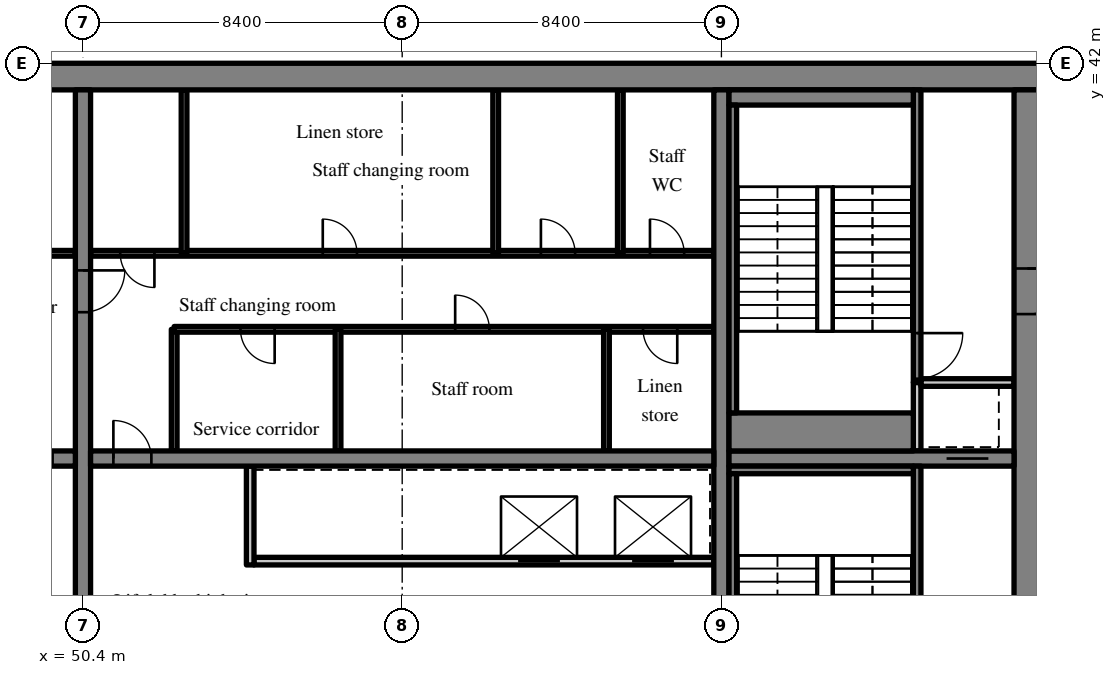
"""IFC4 building model, lengths in metres.
Left out: names, types, materials, properties, quantities, classifications, styles, units other than length and angle.
Written with IfcOpenShell. Run it as: python <this file> out.ifc"""

import sys

from ifc_helpers import new_model, si_unit, direction, frame, frame_2d, origin, place, context, subcontext, project, spatial, rectangle, extrude, source, transform, mapped, element, fill, save


model = new_model("IFC4")
c1 = context("Model", 3, precision=1e-05, world=origin(), true_north=direction((0.0, 1.0)))
c2 = subcontext(c1, "Body", "Model", "MODEL_VIEW")
j1 = project(units=[si_unit("LENGTHUNIT", "METRE"), si_unit("PLANEANGLEUNIT", "RADIAN")], contexts=[c1])
p1 = place(None, origin())
s1 = spatial("IfcSite", under=j1, at=p1, CompositionType="ELEMENT")
p2 = place(p1, origin())
s2 = spatial("IfcBuilding", under=s1, at=p2, CompositionType="ELEMENT")
p3 = place(p2, frame((0.0, 0.0, 146.2)))
s3 = spatial("IfcBuildingStorey", under=s2, at=p3, CompositionType="ELEMENT", Elevation=146.2)
m1 = source(origin(), c2, "Body", "SweptSolid", [
    extrude(rectangle(XDim=50.4, YDim=0.7, at=frame_2d((25.2, 0.0))), origin(), (0.0, 0.0, 1.0), 5.12),
])
p4 = place(p3, frame((25.2, 41.65, 0.0), z_axis=(0.0, 0.0, 1.0), x_axis=(1.0, 0.0, 0.0)))
e1 = element("IfcWall", 1, at=p4, inside=s3, PredefinedType="SHEAR", context=c2, shape_type="MappedRepresentation", body=[
    mapped(m1, transform((0.0, 0.0, 0.0), scale=1.0)),
])
m2 = source(origin(), c2, "Body", "SweptSolid", [
    extrude(rectangle(XDim=18.6, YDim=0.7, at=frame_2d((9.3, 0.0))), origin(), (0.0, 0.0, 1.0), 5.12),
])
p5 = place(p3, frame((75.25, 22.7, 0.0), z_axis=(0.0, 0.0, 1.0), x_axis=(0.0, 1.0, 0.0)))
e2 = element("IfcWall", 2, at=p5, inside=s3, PredefinedType="SHEAR", context=c2, shape_type="MappedRepresentation", body=[
    mapped(m2, transform((0.0, 0.0, 0.0), scale=1.0)),
])
m3 = source(origin(), c2, "Body", "SweptSolid", [
    extrude(rectangle(XDim=1.2, YDim=2.1, at=frame_2d((0.6, 1.05))), frame((0.0, 0.36, 0.0), z_axis=(0.0, -1.0, 0.0), x_axis=(1.0, 0.0, 0.0)), (0.0, 0.0, 1.0), 0.72),
])
p6 = place(p5, frame((12.7, 0.0, 0.0)))
e3 = element("IfcOpeningElement", 3, at=p6, cuts=e2, PredefinedType="OPENING", context=c2, shape_type="MappedRepresentation", body=[
    mapped(m3, transform((0.0, 0.0, 0.0), scale=1.0)),
])
m4 = source(origin(), c2, "Body", "SweptSolid", [
    extrude(rectangle(XDim=18.6, YDim=0.4, at=frame_2d((9.3, 0.0))), origin(), (0.0, 0.0, 1.0), 5.12),
])
p7 = place(p3, frame((50.4, 22.7, 0.0), z_axis=(0.0, 0.0, 1.0), x_axis=(0.0, 1.0, 0.0)))
e4 = element("IfcWall", 4, at=p7, inside=s3, PredefinedType="SHEAR", context=c2, shape_type="MappedRepresentation", body=[
    mapped(m4, transform((0.0, 0.0, 0.0), scale=1.0)),
])
m5 = source(origin(), c2, "Body", "SweptSolid", [
    extrude(rectangle(XDim=1.1, YDim=2.1, at=frame_2d((0.55, 1.05))), frame((0.0, 0.21, 0.0), z_axis=(0.0, -1.0, 0.0), x_axis=(1.0, 0.0, 0.0)), (0.0, 0.0, 1.0), 0.42),
])
p8 = place(p7, frame((12.75, 0.0, 0.0)))
e5 = element("IfcOpeningElement", 5, at=p8, cuts=e4, PredefinedType="OPENING", context=c2, shape_type="MappedRepresentation", body=[
    mapped(m5, transform((0.0, 0.0, 0.0), scale=1.0)),
])
p9 = place(p3, frame((67.2, 22.7, 0.0), z_axis=(0.0, 0.0, 1.0), x_axis=(0.0, 1.0, 0.0)))
e6 = element("IfcWall", 6, at=p9, inside=s3, PredefinedType="SHEAR", context=c2, shape_type="MappedRepresentation", body=[
    mapped(m4, transform((0.0, 0.0, 0.0), scale=1.0)),
])
m6 = source(origin(), c2, "Body", "SweptSolid", [
    extrude(rectangle(XDim=16.4, YDim=0.4, at=frame_2d((8.2, 0.0))), origin(), (0.0, 0.0, 1.0), 5.12),
])
p10 = place(p3, frame((33.8, 31.6, 0.0), z_axis=(0.0, 0.0, 1.0), x_axis=(1.0, 0.0, 0.0)))
e7 = element("IfcWall", 7, at=p10, inside=s3, PredefinedType="SHEAR", context=c2, shape_type="MappedRepresentation", body=[
    mapped(m6, transform((0.0, 0.0, 0.0), scale=1.0)),
])
m7 = source(origin(), c2, "Body", "SweptSolid", [
    extrude(rectangle(XDim=1.0, YDim=2.1, at=frame_2d((0.5, 1.05))), frame((0.0, 0.21, 0.0), z_axis=(0.0, -1.0, 0.0), x_axis=(1.0, 0.0, 0.0)), (0.0, 0.0, 1.0), 0.42),
])
p11 = place(p10, frame((14.8, 0.0, 0.0)))
e8 = element("IfcOpeningElement", 8, at=p11, cuts=e7, PredefinedType="OPENING", context=c2, shape_type="MappedRepresentation", body=[
    mapped(m7, transform((0.0, 0.0, 0.0), scale=1.0)),
])
p12 = place(p3, frame((50.6, 31.6, 0.0), z_axis=(0.0, 0.0, 1.0), x_axis=(1.0, 0.0, 0.0)))
e9 = element("IfcWall", 9, at=p12, inside=s3, PredefinedType="SHEAR", context=c2, shape_type="MappedRepresentation", body=[
    mapped(m6, transform((0.0, 0.0, 0.0), scale=1.0)),
])
p13 = place(p12, frame((0.6, 0.0, 0.0)))
e10 = element("IfcOpeningElement", 10, at=p13, cuts=e9, PredefinedType="OPENING", context=c2, shape_type="MappedRepresentation", body=[
    mapped(m7, transform((0.0, 0.0, 0.0), scale=1.0)),
])
m8 = source(origin(), c2, "Body", "SweptSolid", [
    extrude(rectangle(XDim=7.5, YDim=0.4, at=frame_2d((3.75, 0.0))), origin(), (0.0, 0.0, 1.0), 5.12),
])
p14 = place(p3, frame((67.4, 31.6, 0.0), z_axis=(0.0, 0.0, 1.0), x_axis=(1.0, 0.0, 0.0)))
e11 = element("IfcWall", 11, at=p14, inside=s3, PredefinedType="SHEAR", context=c2, shape_type="MappedRepresentation", body=[
    mapped(m8, transform((0.0, 0.0, 0.0), scale=1.0)),
])
p15 = place(p14, frame((5.725, 0.0, 0.0)))
e12 = element("IfcOpeningElement", 12, at=p15, cuts=e11, PredefinedType="OPENING", context=c2, shape_type="MappedRepresentation", body=[
    mapped(m5, transform((0.0, 0.0, 0.0), scale=1.0)),
])
m9 = source(origin(), c2, "Body", "SweptSolid", [
    extrude(rectangle(XDim=3.559, YDim=0.3, at=frame_2d((1.78, 0.0))), origin(), (0.0, 0.0, 1.0), 5.12),
])
p16 = place(p3, frame((76.523, 43.292, 0.0), z_axis=(0.0, 0.0, 1.0), x_axis=(-0.35779745313, -0.933799219604, 0.0)))
e13 = element("IfcWall", 13, at=p16, inside=s3, PredefinedType="SOLIDWALL", context=c2, shape_type="MappedRepresentation", body=[
    mapped(m9, transform((0.0, 0.0, 0.0), scale=1.0)),
])
m10 = source(origin(), c2, "Body", "SweptSolid", [
    extrude(rectangle(XDim=1.5, YDim=2.0, at=frame_2d((0.75, 1.0))), frame((0.0, 0.16, 0.0), z_axis=(0.0, -1.0, 0.0), x_axis=(1.0, 0.0, 0.0)), (0.0, 0.0, 1.0), 0.32),
])
p17 = place(p16, frame((0.156, 0.0, 0.9)))
e14 = element("IfcOpeningElement", 14, at=p17, cuts=e13, PredefinedType="OPENING", context=c2, shape_type="MappedRepresentation", body=[
    mapped(m10, transform((0.0, 0.0, 0.0), scale=1.0)),
])
m11 = source(origin(), c2, "Body", "SweptSolid", [
    extrude(rectangle(XDim=16.4, YDim=0.15, at=frame_2d((8.2, 0.0))), origin(), (0.0, 0.0, 1.0), 5.12),
])
p18 = place(p3, frame((33.8, 37.0, 0.0), z_axis=(0.0, 0.0, 1.0), x_axis=(1.0, 0.0, 0.0)))
e15 = element("IfcWall", 15, at=p18, inside=s3, PredefinedType="PARTITIONING", context=c2, shape_type="MappedRepresentation", body=[
    mapped(m11, transform((0.0, 0.0, 0.0), scale=1.0)),
])
m12 = source(origin(), c2, "Body", "SweptSolid", [
    extrude(rectangle(XDim=0.9, YDim=2.1, at=frame_2d((0.45, 1.05))), frame((0.0, 0.085, 0.0), z_axis=(0.0, -1.0, 0.0), x_axis=(1.0, 0.0, 0.0)), (0.0, 0.0, 1.0), 0.17),
])
p19 = place(p18, frame((3.24, 0.0, 0.0)))
e16 = element("IfcOpeningElement", 16, at=p19, cuts=e15, PredefinedType="OPENING", context=c2, shape_type="MappedRepresentation", body=[
    mapped(m12, transform((0.0, 0.0, 0.0), scale=1.0)),
])
p20 = place(p18, frame((8.16, 0.0, 0.0)))
e17 = element("IfcOpeningElement", 17, at=p20, cuts=e15, PredefinedType="OPENING", context=c2, shape_type="MappedRepresentation", body=[
    mapped(m12, transform((0.0, 0.0, 0.0), scale=1.0)),
])
p21 = place(p18, frame((11.44, 0.0, 0.0)))
e18 = element("IfcOpeningElement", 18, at=p21, cuts=e15, PredefinedType="OPENING", context=c2, shape_type="MappedRepresentation", body=[
    mapped(m12, transform((0.0, 0.0, 0.0), scale=1.0)),
])
p22 = place(p18, frame((14.72, 0.0, 0.0)))
e19 = element("IfcOpeningElement", 19, at=p22, cuts=e15, PredefinedType="OPENING", context=c2, shape_type="MappedRepresentation", body=[
    mapped(m12, transform((0.0, 0.0, 0.0), scale=1.0)),
])
m13 = source(origin(), c2, "Body", "SweptSolid", [
    extrude(rectangle(XDim=12.1, YDim=0.2, at=frame_2d((6.05, 0.0))), origin(), (0.0, 0.0, 1.0), 5.12),
])
p23 = place(p3, frame((67.0, 28.9, 0.0), z_axis=(0.0, 0.0, 1.0), x_axis=(-1.0, 0.0, 0.0)))
e20 = element("IfcWall", 20, at=p23, inside=s3, PredefinedType="SOLIDWALL", context=c2, shape_type="MappedRepresentation", body=[
    mapped(m13, transform((0.0, 0.0, 0.0), scale=1.0)),
])
m14 = source(origin(), c2, "Body", "SweptSolid", [
    extrude(rectangle(XDim=1.1, YDim=2.1, at=frame_2d((0.55, 1.05))), frame((0.0, 0.11, 0.0), z_axis=(0.0, -1.0, 0.0), x_axis=(1.0, 0.0, 0.0)), (0.0, 0.0, 1.0), 0.22),
])
p24 = place(p23, frame((1.05, 0.0, 0.0)))
e21 = element("IfcOpeningElement", 21, at=p24, cuts=e20, PredefinedType="OPENING", context=c2, shape_type="MappedRepresentation", body=[
    mapped(m14, transform((0.0, 0.0, 0.0), scale=1.0)),
])
p25 = place(p23, frame((4.05, 0.0, 0.0)))
e22 = element("IfcOpeningElement", 22, at=p25, cuts=e20, PredefinedType="OPENING", context=c2, shape_type="MappedRepresentation", body=[
    mapped(m14, transform((0.0, 0.0, 0.0), scale=1.0)),
])
m15 = source(origin(), c2, "Body", "SweptSolid", [
    extrude(rectangle(XDim=2.6, YDim=0.2, at=frame_2d((1.3, 0.0))), origin(), (0.0, 0.0, 1.0), 5.12),
])
p26 = place(p3, frame((54.8, 28.8, 0.0), z_axis=(0.0, 0.0, 1.0), x_axis=(0.0, 1.0, 0.0)))
e23 = element("IfcWall", 23, at=p26, inside=s3, PredefinedType="SOLIDWALL", context=c2, shape_type="MappedRepresentation", body=[
    mapped(m15, transform((0.0, 0.0, 0.0), scale=1.0)),
])
m16 = source(origin(), c2, "Body", "SweptSolid", [
    extrude(rectangle(XDim=3.2, YDim=0.15, at=frame_2d((1.6, 0.0))), origin(), (0.0, 0.0, 1.0), 5.12),
])
p27 = place(p3, frame((52.8, 31.8, 0.0), z_axis=(0.0, 0.0, 1.0), x_axis=(0.0, 1.0, 0.0)))
e24 = element("IfcWall", 24, at=p27, inside=s3, PredefinedType="PARTITIONING", context=c2, shape_type="MappedRepresentation", body=[
    mapped(m16, transform((0.0, 0.0, 0.0), scale=1.0)),
])
m17 = source(origin(), c2, "Body", "SweptSolid", [
    extrude(rectangle(XDim=14.2, YDim=0.15, at=frame_2d((7.1, 0.0))), origin(), (0.0, 0.0, 1.0), 5.12),
])
p28 = place(p3, frame((67.0, 35.0, 0.0), z_axis=(0.0, 0.0, 1.0), x_axis=(-1.0, 0.0, 0.0)))
e25 = element("IfcWall", 25, at=p28, inside=s3, PredefinedType="PARTITIONING", context=c2, shape_type="MappedRepresentation", body=[
    mapped(m17, transform((0.0, 0.0, 0.0), scale=1.0)),
])
p29 = place(p28, frame((0.962, 0.0, 0.0)))
e26 = element("IfcOpeningElement", 26, at=p29, cuts=e25, PredefinedType="OPENING", context=c2, shape_type="MappedRepresentation", body=[
    mapped(m12, transform((0.0, 0.0, 0.0), scale=1.0)),
])
p30 = place(p28, frame((5.906, 0.0, 0.0)))
e27 = element("IfcOpeningElement", 27, at=p30, cuts=e25, PredefinedType="OPENING", context=c2, shape_type="MappedRepresentation", body=[
    mapped(m12, transform((0.0, 0.0, 0.0), scale=1.0)),
])
p31 = place(p28, frame((11.556, 0.0, 0.0)))
e28 = element("IfcOpeningElement", 28, at=p31, cuts=e25, PredefinedType="OPENING", context=c2, shape_type="MappedRepresentation", body=[
    mapped(m12, transform((0.0, 0.0, 0.0), scale=1.0)),
])
p32 = place(p3, frame((67.0, 37.0, 0.0), z_axis=(0.0, 0.0, 1.0), x_axis=(-1.0, 0.0, 0.0)))
e29 = element("IfcWall", 29, at=p32, inside=s3, PredefinedType="PARTITIONING", context=c2, shape_type="MappedRepresentation", body=[
    mapped(m11, transform((0.0, 0.0, 0.0), scale=1.0)),
])
p33 = place(p32, frame((0.78, 0.0, 0.0)))
e30 = element("IfcOpeningElement", 30, at=p33, cuts=e29, PredefinedType="OPENING", context=c2, shape_type="MappedRepresentation", body=[
    mapped(m12, transform((0.0, 0.0, 0.0), scale=1.0)),
])
p34 = place(p32, frame((3.65, 0.0, 0.0)))
e31 = element("IfcOpeningElement", 31, at=p34, cuts=e29, PredefinedType="OPENING", context=c2, shape_type="MappedRepresentation", body=[
    mapped(m12, transform((0.0, 0.0, 0.0), scale=1.0)),
])
p35 = place(p32, frame((9.39, 0.0, 0.0)))
e32 = element("IfcOpeningElement", 32, at=p35, cuts=e29, PredefinedType="OPENING", context=c2, shape_type="MappedRepresentation", body=[
    mapped(m12, transform((0.0, 0.0, 0.0), scale=1.0)),
])
p36 = place(p32, frame((14.72, 0.0, 0.0)))
e33 = element("IfcOpeningElement", 33, at=p36, cuts=e29, PredefinedType="OPENING", context=c2, shape_type="MappedRepresentation", body=[
    mapped(m12, transform((0.0, 0.0, 0.0), scale=1.0)),
])
for number, where, z_axis, x_axis in (
    (34, (64.175, 31.8, 0.0), (0.0, 0.0, 1.0), (0.0, 1.0, 0.0)),
    (35, (57.112, 31.8, 0.0), (0.0, 0.0, 1.0), (0.0, 1.0, 0.0)),
):
    element("IfcWall", number, at=place(p3, frame(where, z_axis=z_axis, x_axis=x_axis)), inside=s3, PredefinedType="PARTITIONING", context=c2, shape_type="MappedRepresentation", body=[
        mapped(m16, transform((0.0, 0.0, 0.0), scale=1.0)),
    ])
m18 = source(origin(), c2, "Body", "SweptSolid", [
    extrude(rectangle(XDim=4.3, YDim=0.15, at=frame_2d((2.15, 0.0))), origin(), (0.0, 0.0, 1.0), 5.12),
])
for number, where, z_axis, x_axis in (
    (36, (64.54, 37.0, 0.0), (0.0, 0.0, 1.0), (0.0, 1.0, 0.0)),
    (37, (61.26, 37.0, 0.0), (0.0, 0.0, 1.0), (0.0, 1.0, 0.0)),
    (38, (53.06, 37.0, 0.0), (0.0, 0.0, 1.0), (0.0, 1.0, 0.0)),
):
    element("IfcWall", number, at=place(p3, frame(where, z_axis=z_axis, x_axis=x_axis)), inside=s3, PredefinedType="PARTITIONING", context=c2, shape_type="MappedRepresentation", body=[
        mapped(m18, transform((0.0, 0.0, 0.0), scale=1.0)),
    ])
m19 = source(origin(), c2, "Body", "SweptSolid", [
    extrude(rectangle(XDim=8.7, YDim=0.2, at=frame_2d((4.35, 0.0))), origin(), (0.0, 0.0, 1.0), 5.12),
])
p37 = place(p3, frame((72.35, 22.7, 0.0), z_axis=(0.0, 0.0, 1.0), x_axis=(0.0, 1.0, 0.0)))
e39 = element("IfcWall", 39, at=p37, inside=s3, PredefinedType="SOLIDWALL", context=c2, shape_type="MappedRepresentation", body=[
    mapped(m19, transform((0.0, 0.0, 0.0), scale=1.0)),
])
m20 = source(origin(), c2, "Body", "SweptSolid", [
    extrude(rectangle(XDim=1.2, YDim=2.1, at=frame_2d((0.6, 1.05))), frame((0.0, 0.11, 0.0), z_axis=(0.0, -1.0, 0.0), x_axis=(1.0, 0.0, 0.0)), (0.0, 0.0, 1.0), 0.22),
])
p38 = place(p37, frame((0.9, 0.0, 0.0)))
e40 = element("IfcOpeningElement", 40, at=p38, cuts=e39, PredefinedType="OPENING", context=c2, shape_type="MappedRepresentation", body=[
    mapped(m20, transform((0.0, 0.0, 0.0), scale=1.0)),
])
m21 = source(origin(), c2, "Body", "SweptSolid", [
    extrude(rectangle(XDim=1.8, YDim=0.2, at=frame_2d((0.9, 0.0))), origin(), (0.0, 0.0, 1.0), 5.12),
])
p39 = place(p3, frame((72.35, 31.8, 0.0), z_axis=(0.0, 0.0, 1.0), x_axis=(0.0, 1.0, 0.0)))
e41 = element("IfcWall", 41, at=p39, inside=s3, PredefinedType="SOLIDWALL", context=c2, shape_type="MappedRepresentation", body=[
    mapped(m21, transform((0.0, 0.0, 0.0), scale=1.0)),
])
m22 = source(origin(), c2, "Body", "SweptSolid", [
    extrude(rectangle(XDim=2.45, YDim=0.2, at=frame_2d((1.225, 0.0))), origin(), (0.0, 0.0, 1.0), 5.12),
])
p40 = place(p3, frame((72.45, 33.6, 0.0), z_axis=(0.0, 0.0, 1.0), x_axis=(1.0, 0.0, 0.0)))
e42 = element("IfcWall", 42, at=p40, inside=s3, PredefinedType="SOLIDWALL", context=c2, shape_type="MappedRepresentation", body=[
    mapped(m22, transform((0.0, 0.0, 0.0), scale=1.0)),
])
m23 = source(origin(), c2, "Body", "SweptSolid", [
    extrude(rectangle(XDim=7.7, YDim=0.2, at=frame_2d((3.85, 0.0))), origin(), (0.0, 0.0, 1.0), 5.12),
])
p41 = place(p3, frame((72.35, 33.6, 0.0), z_axis=(0.0, 0.0, 1.0), x_axis=(0.0, 1.0, 0.0)))
e43 = element("IfcWall", 43, at=p41, inside=s3, PredefinedType="SOLIDWALL", context=c2, shape_type="MappedRepresentation", body=[
    mapped(m23, transform((0.0, 0.0, 0.0), scale=1.0)),
])
p42 = place(p41, frame((0.1, 0.0, 0.0)))
e44 = element("IfcOpeningElement", 44, at=p42, cuts=e43, PredefinedType="OPENING", context=c2, shape_type="MappedRepresentation", body=[
    mapped(m20, transform((0.0, 0.0, 0.0), scale=1.0)),
])
m24 = source(origin(), c2, "Body", "SweptSolid", [
    extrude(rectangle(XDim=4.85, YDim=0.2, at=frame_2d((2.425, 0.0))), origin(), (0.0, 0.0, 1.0), 5.12),
])
p43 = place(p3, frame((67.4, 31.3, 0.0), z_axis=(0.0, 0.0, 1.0), x_axis=(1.0, 0.0, 0.0)))
e45 = element("IfcWall", 45, at=p43, inside=s3, PredefinedType="SOLIDWALL", context=c2, shape_type="MappedRepresentation", body=[
    mapped(m24, transform((0.0, 0.0, 0.0), scale=1.0)),
])
m25 = source(origin(), c2, "Body", "SweptSolid", [
    extrude(rectangle(XDim=8.1, YDim=0.2, at=frame_2d((4.05, 0.0))), origin(), (0.0, 0.0, 1.0), 5.12),
])
p44 = place(p3, frame((67.5, 23.1, 0.0), z_axis=(0.0, 0.0, 1.0), x_axis=(0.0, 1.0, 0.0)))
e46 = element("IfcWall", 46, at=p44, inside=s3, PredefinedType="SOLIDWALL", context=c2, shape_type="MappedRepresentation", body=[
    mapped(m25, transform((0.0, 0.0, 0.0), scale=1.0)),
])
m26 = source(origin(), c2, "Body", "SweptSolid", [
    extrude(rectangle(XDim=4.85, YDim=0.4, at=frame_2d((2.425, 0.0))), origin(), (0.0, 0.0, 1.0), 5.12),
])
p45 = place(p3, frame((67.4, 41.1, 0.0), z_axis=(0.0, 0.0, 1.0), x_axis=(1.0, 0.0, 0.0)))
e47 = element("IfcWall", 47, at=p45, inside=s3, PredefinedType="SOLIDWALL", context=c2, shape_type="MappedRepresentation", body=[
    mapped(m26, transform((0.0, 0.0, 0.0), scale=1.0)),
])
m27 = source(origin(), c2, "Body", "SweptSolid", [
    extrude(rectangle(XDim=4.85, YDim=1.0, at=frame_2d((2.425, 0.0))), origin(), (0.0, 0.0, 1.0), 5.12),
])
p46 = place(p3, frame((67.4, 32.3, 0.0), z_axis=(0.0, 0.0, 1.0), x_axis=(1.0, 0.0, 0.0)))
e48 = element("IfcWall", 48, at=p46, inside=s3, PredefinedType="SOLIDWALL", context=c2, shape_type="MappedRepresentation", body=[
    mapped(m27, transform((0.0, 0.0, 0.0), scale=1.0)),
])
p47 = place(p3, frame((67.5, 32.8, 0.0), z_axis=(0.0, 0.0, 1.0), x_axis=(0.0, 1.0, 0.0)))
e49 = element("IfcWall", 49, at=p47, inside=s3, PredefinedType="SOLIDWALL", context=c2, shape_type="MappedRepresentation", body=[
    mapped(m25, transform((0.0, 0.0, 0.0), scale=1.0)),
])
m28 = source(origin(), c2, "Body", "SweptSolid", [
    extrude(rectangle(XDim=1.0, YDim=2.1, at=frame_2d((0.5, 1.05))), frame((0.0, 0.025, 0.0), z_axis=(0.0, -1.0, 0.0), x_axis=(1.0, 0.0, 0.0)), (0.0, 0.0, 1.0), 0.05),
])
p48 = place(p13, origin())
e50 = element("IfcDoor", 50, at=p48, inside=s3, OperationType="SINGLE_SWING_LEFT", PredefinedType="DOOR", context=c2, shape_type="MappedRepresentation", body=[
    mapped(m28, transform((0.0, 0.0, 0.0), scale=1.0)),
])
fill(e10, e50)
m29 = source(origin(), c2, "Body", "SweptSolid", [
    extrude(rectangle(XDim=1.1, YDim=2.1, at=frame_2d((0.55, 1.05))), frame((0.0, 0.025, 0.0), z_axis=(0.0, -1.0, 0.0), x_axis=(1.0, 0.0, 0.0)), (0.0, 0.0, 1.0), 0.05),
])
p49 = place(p24, origin())
e51 = element("IfcDoor", 51, at=p49, inside=s3, OperationType="SLIDING_TO_LEFT", PredefinedType="DOOR", context=c2, shape_type="MappedRepresentation", body=[
    mapped(m29, transform((0.0, 0.0, 0.0), scale=1.0)),
])
fill(e21, e51)
p50 = place(p25, origin())
e52 = element("IfcDoor", 52, at=p50, inside=s3, OperationType="SLIDING_TO_RIGHT", PredefinedType="DOOR", context=c2, shape_type="MappedRepresentation", body=[
    mapped(m29, transform((0.0, 0.0, 0.0), scale=1.0)),
])
fill(e22, e52)
m30 = source(origin(), c2, "Body", "SweptSolid", [
    extrude(rectangle(XDim=0.9, YDim=2.1, at=frame_2d((0.45, 1.05))), frame((0.0, 0.025, 0.0), z_axis=(0.0, -1.0, 0.0), x_axis=(1.0, 0.0, 0.0)), (0.0, 0.0, 1.0), 0.05),
])
p51 = place(p29, origin())
e53 = element("IfcDoor", 53, at=p51, inside=s3, OperationType="SINGLE_SWING_LEFT", PredefinedType="DOOR", context=c2, shape_type="MappedRepresentation", body=[
    mapped(m30, transform((0.0, 0.0, 0.0), scale=1.0)),
])
fill(e26, e53)
p52 = place(p30, origin())
e54 = element("IfcDoor", 54, at=p52, inside=s3, OperationType="SINGLE_SWING_RIGHT", PredefinedType="DOOR", context=c2, shape_type="MappedRepresentation", body=[
    mapped(m30, transform((0.0, 0.0, 0.0), scale=1.0)),
])
fill(e27, e54)
p53 = place(p31, origin())
e55 = element("IfcDoor", 55, at=p53, inside=s3, OperationType="SINGLE_SWING_LEFT", PredefinedType="DOOR", context=c2, shape_type="MappedRepresentation", body=[
    mapped(m30, transform((0.0, 0.0, 0.0), scale=1.0)),
])
fill(e28, e55)
p54 = place(p33, origin())
e56 = element("IfcDoor", 56, at=p54, inside=s3, OperationType="SINGLE_SWING_RIGHT", PredefinedType="DOOR", context=c2, shape_type="MappedRepresentation", body=[
    mapped(m30, transform((0.0, 0.0, 0.0), scale=1.0)),
])
fill(e30, e56)
p55 = place(p34, origin())
e57 = element("IfcDoor", 57, at=p55, inside=s3, OperationType="SINGLE_SWING_RIGHT", PredefinedType="DOOR", context=c2, shape_type="MappedRepresentation", body=[
    mapped(m30, transform((0.0, 0.0, 0.0), scale=1.0)),
])
fill(e31, e57)
p56 = place(p35, origin())
e58 = element("IfcDoor", 58, at=p56, inside=s3, OperationType="SINGLE_SWING_RIGHT", PredefinedType="DOOR", context=c2, shape_type="MappedRepresentation", body=[
    mapped(m30, transform((0.0, 0.0, 0.0), scale=1.0)),
])
fill(e32, e58)
p57 = place(p36, origin())
e59 = element("IfcDoor", 59, at=p57, inside=s3, OperationType="SINGLE_SWING_LEFT", PredefinedType="DOOR", context=c2, shape_type="MappedRepresentation", body=[
    mapped(m30, transform((0.0, 0.0, 0.0), scale=1.0)),
])
fill(e33, e59)
p58 = place(p15, origin())
e60 = element("IfcDoor", 60, at=p58, inside=s3, OperationType="SLIDING_TO_RIGHT", PredefinedType="DOOR", context=c2, shape_type="MappedRepresentation", body=[
    mapped(m29, transform((0.0, 0.0, 0.0), scale=1.0)),
])
fill(e12, e60)
m31 = source(origin(), c2, "Body", "SweptSolid", [
    extrude(rectangle(XDim=1.2, YDim=2.1, at=frame_2d((0.6, 1.05))), frame((0.0, 0.025, 0.0), z_axis=(0.0, -1.0, 0.0), x_axis=(1.0, 0.0, 0.0)), (0.0, 0.0, 1.0), 0.05),
])
p59 = place(p42, origin())
e61 = element("IfcDoor", 61, at=p59, inside=s3, OperationType="SINGLE_SWING_RIGHT", PredefinedType="DOOR", context=c2, shape_type="MappedRepresentation", body=[
    mapped(m31, transform((0.0, 0.0, 0.0), scale=1.0)),
])
fill(e44, e61)
p60 = place(p6, origin())
e62 = element("IfcDoor", 62, at=p60, inside=s3, OperationType="SINGLE_SWING_RIGHT", PredefinedType="DOOR", context=c2, shape_type="MappedRepresentation", body=[
    mapped(m31, transform((0.0, 0.0, 0.0), scale=1.0)),
])
fill(e3, e62)
p61 = place(p8, origin())
e63 = element("IfcDoor", 63, at=p61, inside=s3, OperationType="SINGLE_SWING_RIGHT", PredefinedType="DOOR", context=c2, shape_type="MappedRepresentation", body=[
    mapped(m29, transform((0.0, 0.0, 0.0), scale=1.0)),
])
fill(e5, e63)
save(model, sys.argv[1])
